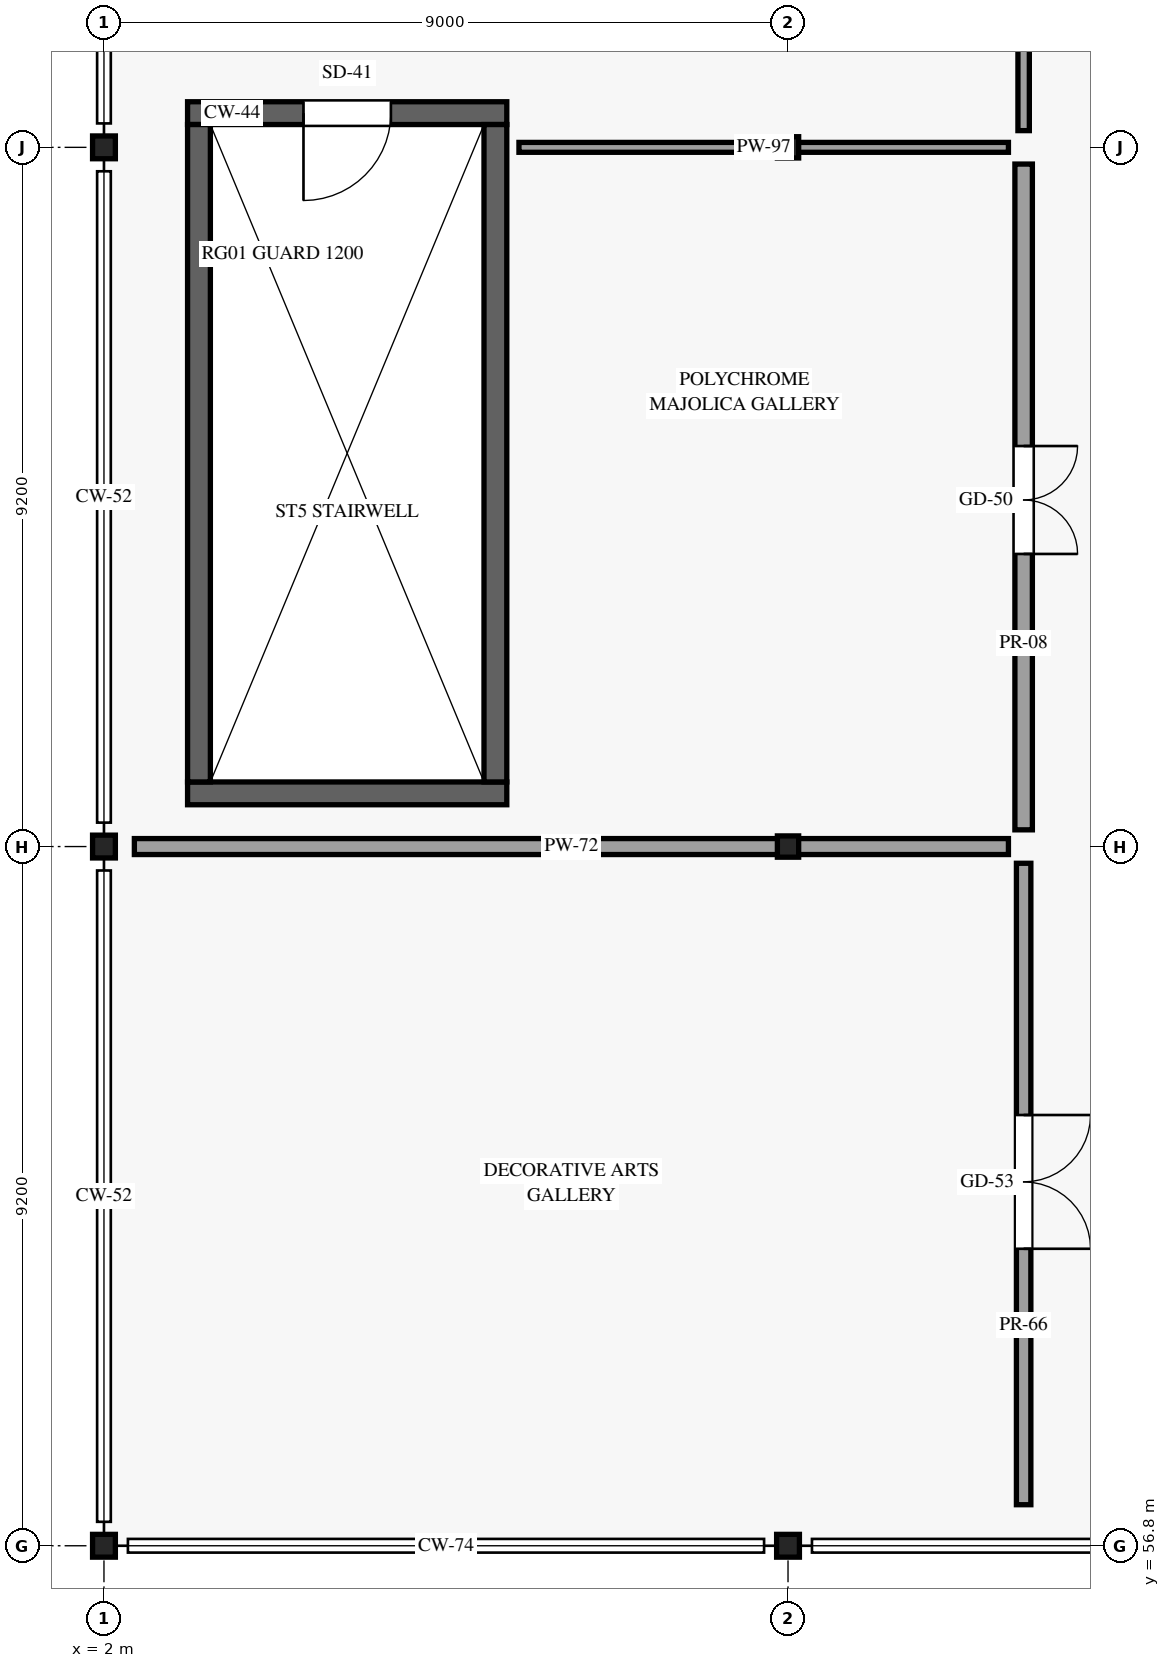
"""IFC4 building model, lengths in metres.
Left out: names, types, materials, properties, quantities, classifications, styles, units other than length and angle.
Written with IfcOpenShell. Run it as: python <this file> out.ifc"""

import sys

from ifc_helpers import new_model, si_unit, direction, frame, frame_2d, origin, origin_2d, place, context, subcontext, project, spatial, rectangle, i_section, extrude, element, fill, save


model = new_model("IFC4")
c1 = context("Model", 3, precision=1e-05, world=origin(), true_north=direction((0.0, 1.0)))
c2 = subcontext(c1, "Body", "Model", "MODEL_VIEW")
j1 = project(units=[si_unit("LENGTHUNIT", "METRE"), si_unit("PLANEANGLEUNIT", "RADIAN")], contexts=[c1])
p1 = place(None, origin())
s1 = spatial("IfcSite", under=j1, at=p1, CompositionType="ELEMENT")
p2 = place(p1, origin())
s2 = spatial("IfcBuilding", under=s1, at=p2, CompositionType="ELEMENT")
p3 = place(p2, frame((0.0, 0.0, 5.4)))
s3 = spatial("IfcBuildingStorey", under=s2, at=p3, CompositionType="ELEMENT", Elevation=5.4)
for number, where, z_axis, x_axis in (
    (1, (2.0, 56.8, 0.0), (0.0, 0.0, 1.0), (1.0, 0.0, 0.0)),
    (2, (2.0, 66.0, 0.0), (0.0, 0.0, 1.0), (1.0, 0.0, 0.0)),
    (3, (2.0, 75.2, 0.0), (0.0, 0.0, 1.0), (1.0, 0.0, 0.0)),
    (4, (11.0, 56.8, 0.0), (0.0, 0.0, 1.0), (1.0, 0.0, 0.0)),
):
    element("IfcColumn", number, at=place(p3, frame(where, z_axis=z_axis, x_axis=x_axis)), inside=s3, PredefinedType="COLUMN", context=c2, shape_type="SweptSolid", body=[
        extrude(i_section(OverallWidth=0.3, OverallDepth=0.3, WebThickness=0.011, FlangeThickness=0.019, FilletRadius=0.027, at=origin_2d()), origin(), (0.0, 0.0, 1.0), 4.8),
    ])
for number, where, z_axis, x_axis in (
    (5, (11.0, 66.0, 0.0), (0.0, 0.0, 1.0), (1.0, 0.0, 0.0)),
    (6, (11.0, 75.2, 0.0), (0.0, 0.0, 1.0), (1.0, 0.0, 0.0)),
):
    element("IfcColumn", number, at=place(p3, frame(where, z_axis=z_axis, x_axis=x_axis)), inside=s3, PredefinedType="COLUMN", context=c2, shape_type="SweptSolid", body=[
        extrude(i_section(OverallWidth=0.28, OverallDepth=0.28, WebThickness=0.01, FlangeThickness=0.018, FilletRadius=0.024, at=origin_2d()), origin(), (0.0, 0.0, 1.0), 4.8),
    ])
p4 = place(p3, frame((3.1, 75.65, 0.0), z_axis=(0.0, 0.0, 1.0), x_axis=(1.0, 0.0, 0.0)))
e7 = element("IfcWall", 7, at=p4, inside=s3, PredefinedType="SHEAR", context=c2, shape_type="SweptSolid", body=[
    extrude(rectangle(XDim=4.2, YDim=0.3, at=frame_2d((2.1, 0.0))), origin(), (0.0, 0.0, 1.0), 4.44),
])
p5 = place(p4, frame((2.675, 0.0, 0.0), z_axis=(0.0, 0.0, 1.0), x_axis=(-1.0, 0.0, 0.0)))
e8 = element("IfcOpeningElement", 8, at=p5, cuts=e7, PredefinedType="OPENING", context=c2, shape_type="SweptSolid", body=[
    extrude(rectangle(XDim=1.15, YDim=2.2, at=frame_2d((0.575, 1.1))), frame((0.0, 0.16, 0.0), z_axis=(0.0, -1.0, 0.0), x_axis=(1.0, 0.0, 0.0)), (0.0, 0.0, 1.0), 0.32),
])
p6 = place(p3, frame((3.1, 66.7, 0.0), z_axis=(0.0, 0.0, 1.0), x_axis=(1.0, 0.0, 0.0)))
e9 = element("IfcWall", 9, at=p6, inside=s3, PredefinedType="SHEAR", context=c2, shape_type="SweptSolid", body=[
    extrude(rectangle(XDim=4.2, YDim=0.3, at=frame_2d((2.1, 0.0))), origin(), (0.0, 0.0, 1.0), 4.44),
])
for number, where, z_axis, x_axis in (
    (10, (3.25, 66.85, 0.0), (0.0, 0.0, 1.0), (0.0, 1.0, 0.0)),
    (11, (7.15, 66.85, 0.0), (0.0, 0.0, 1.0), (0.0, 1.0, 0.0)),
):
    element("IfcWall", number, at=place(p3, frame(where, z_axis=z_axis, x_axis=x_axis)), inside=s3, PredefinedType="SHEAR", context=c2, shape_type="SweptSolid", body=[
        extrude(rectangle(XDim=8.65, YDim=0.3, at=frame_2d((4.325, 0.0))), origin(), (0.0, 0.0, 1.0), 4.44),
    ])
p7 = place(p3, frame((14.1, 57.34, 0.0), z_axis=(0.0, 0.0, 1.0), x_axis=(0.0, 1.0, 0.0)))
e12 = element("IfcWall", 12, at=p7, inside=s3, PredefinedType="PARTITIONING", context=c2, shape_type="SweptSolid", body=[
    extrude(rectangle(XDim=8.44, YDim=0.19, at=frame_2d((4.22, 0.0))), origin(), (0.0, 0.0, 1.0), 4.095),
])
p8 = place(p7, frame((5.128, 0.0, 0.0), z_axis=(0.0, 0.0, 1.0), x_axis=(-1.0, 0.0, 0.0)))
e13 = element("IfcOpeningElement", 13, at=p8, cuts=e12, PredefinedType="OPENING", context=c2, shape_type="SweptSolid", body=[
    extrude(rectangle(XDim=1.76, YDim=2.45, at=frame_2d((0.88, 1.225))), frame((0.0, 0.105, 0.0), z_axis=(0.0, -1.0, 0.0), x_axis=(1.0, 0.0, 0.0)), (0.0, 0.0, 1.0), 0.21),
])
p9 = place(p3, frame((2.4, 66.0, 0.0), z_axis=(0.0, 0.0, 1.0), x_axis=(1.0, 0.0, 0.0)))
e14 = element("IfcWall", 14, at=p9, inside=s3, PredefinedType="PARTITIONING", context=c2, shape_type="SweptSolid", body=[
    extrude(rectangle(XDim=11.5, YDim=0.21, at=frame_2d((5.75, 0.0))), origin(), (0.0, 0.0, 1.0), 4.095),
])
p10 = place(p3, frame((14.1, 66.22, 0.0), z_axis=(0.0, 0.0, 1.0), x_axis=(0.0, 1.0, 0.0)))
e15 = element("IfcWall", 15, at=p10, inside=s3, PredefinedType="PARTITIONING", context=c2, shape_type="SweptSolid", body=[
    extrude(rectangle(XDim=8.76, YDim=0.23, at=frame_2d((4.38, 0.0))), origin(), (0.0, 0.0, 1.0), 4.095),
])
p11 = place(p10, frame((5.05, 0.0, 0.0), z_axis=(0.0, 0.0, 1.0), x_axis=(-1.0, 0.0, 0.0)))
e16 = element("IfcOpeningElement", 16, at=p11, cuts=e15, PredefinedType="OPENING", context=c2, shape_type="SweptSolid", body=[
    extrude(rectangle(XDim=1.42, YDim=2.3, at=frame_2d((0.71, 1.15))), frame((0.0, 0.125, 0.0), z_axis=(0.0, -1.0, 0.0), x_axis=(1.0, 0.0, 0.0)), (0.0, 0.0, 1.0), 0.25),
])
p12 = place(p3, frame((7.46, 75.2, 0.0), z_axis=(0.0, 0.0, 1.0), x_axis=(1.0, 0.0, 0.0)))
e17 = element("IfcWall", 17, at=p12, inside=s3, PredefinedType="PARTITIONING", context=c2, shape_type="SweptSolid", body=[
    extrude(rectangle(XDim=6.44, YDim=0.13, at=frame_2d((3.22, 0.0))), origin(), (0.0, 0.0, 1.0), 4.095),
])
p13 = place(p3, frame((14.1, 75.42, 0.0), z_axis=(0.0, 0.0, 1.0), x_axis=(0.0, 1.0, 0.0)))
e18 = element("IfcWall", 18, at=p13, inside=s3, PredefinedType="PARTITIONING", context=c2, shape_type="SweptSolid", body=[
    extrude(rectangle(XDim=17.96, YDim=0.15, at=frame_2d((8.98, 0.0))), origin(), (0.0, 0.0, 1.0), 4.095),
])
p14 = place(p13, frame((5.213, 0.0, 0.0), z_axis=(0.0, 0.0, 1.0), x_axis=(-1.0, 0.0, 0.0)))
e19 = element("IfcOpeningElement", 19, at=p14, cuts=e18, PredefinedType="OPENING", context=c2, shape_type="SweptSolid", body=[
    extrude(rectangle(XDim=1.5, YDim=2.35, at=frame_2d((0.75, 1.175))), frame((0.0, 0.085, 0.0), z_axis=(0.0, -1.0, 0.0), x_axis=(1.0, 0.0, 0.0)), (0.0, 0.0, 1.0), 0.17),
])
p15 = place(p5, origin())
e20 = element("IfcDoor", 20, at=p15, inside=s3, OperationType="SINGLE_SWING_RIGHT", PredefinedType="DOOR", context=c2, shape_type="SweptSolid", body=[
    extrude(rectangle(XDim=1.15, YDim=2.2, at=frame_2d((0.575, 1.1))), frame((0.0, 0.025, 0.0), z_axis=(0.0, -1.0, 0.0), x_axis=(1.0, 0.0, 0.0)), (0.0, 0.0, 1.0), 0.05),
])
fill(e8, e20)
p16 = place(p8, origin())
e21 = element("IfcDoor", 21, at=p16, inside=s3, OperationType="DOUBLE_DOOR_SINGLE_SWING", PredefinedType="DOOR", context=c2, shape_type="SweptSolid", body=[
    extrude(rectangle(XDim=1.76, YDim=2.45, at=frame_2d((0.88, 1.225))), frame((0.0, 0.025, 0.0), z_axis=(0.0, -1.0, 0.0), x_axis=(1.0, 0.0, 0.0)), (0.0, 0.0, 1.0), 0.05),
])
fill(e13, e21)
p17 = place(p11, origin())
e22 = element("IfcDoor", 22, at=p17, inside=s3, OperationType="DOUBLE_DOOR_SINGLE_SWING", PredefinedType="DOOR", context=c2, shape_type="SweptSolid", body=[
    extrude(rectangle(XDim=1.42, YDim=2.3, at=frame_2d((0.71, 1.15))), frame((0.0, 0.025, 0.0), z_axis=(0.0, -1.0, 0.0), x_axis=(1.0, 0.0, 0.0)), (0.0, 0.0, 1.0), 0.05),
])
fill(e16, e22)
save(model, sys.argv[1])
